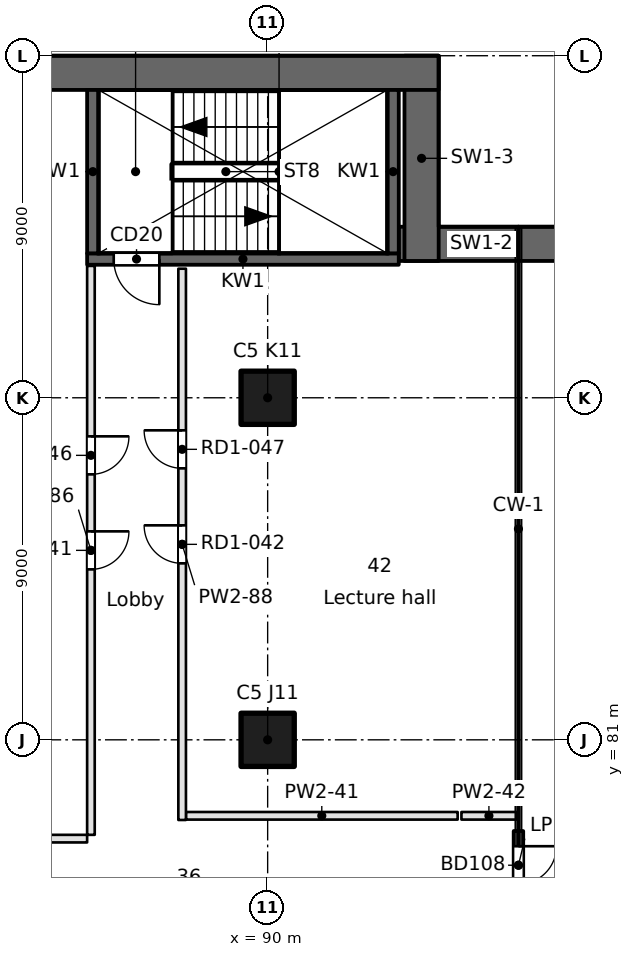
"""IFC4 building model, lengths in metres.
Left out: names, types, materials, properties, quantities, classifications, styles, units other than length and angle.
Written with IfcOpenShell. Run it as: python <this file> out.ifc"""

import sys

from ifc_helpers import new_model, si_unit, direction, frame, frame_2d, origin, origin_2d, place, context, subcontext, project, spatial, rectangle, extrude, element, fill, save


model = new_model("IFC4")
c1 = context("Model", 3, precision=1e-05, world=origin(), true_north=direction((0.0, 1.0)))
c2 = subcontext(c1, "Body", "Model", "MODEL_VIEW")
j1 = project(units=[si_unit("LENGTHUNIT", "METRE"), si_unit("PLANEANGLEUNIT", "RADIAN")], contexts=[c1])
p1 = place(None, origin())
s1 = spatial("IfcSite", under=j1, at=p1, CompositionType="ELEMENT")
p2 = place(p1, origin())
s2 = spatial("IfcBuilding", under=s1, at=p2, CompositionType="ELEMENT")
p3 = place(p2, frame((0.0, 0.0, 72.8)))
s3 = spatial("IfcBuildingStorey", under=s2, at=p3, CompositionType="ELEMENT", Elevation=72.8)
for number, where, z_axis, x_axis in (
    (1, (90.0, 81.0, 0.0), (0.0, 0.0, 1.0), (1.0, 0.0, 0.0)),
    (2, (90.0, 90.0, 0.0), (0.0, 0.0, 1.0), (1.0, 0.0, 0.0)),
):
    element("IfcColumn", number, at=place(p3, frame(where, z_axis=z_axis, x_axis=x_axis)), inside=s3, PredefinedType="COLUMN", context=c2, shape_type="SweptSolid", body=[
        extrude(rectangle(XDim=1.4, YDim=1.4, at=origin_2d()), origin(), (0.0, 0.0, 1.0), 3.7),
    ])
p4 = place(p3, frame((97.8, 94.05, 0.0), z_axis=(0.0, 0.0, 1.0), x_axis=(-1.0, 0.0, 0.0)))
e3 = element("IfcWall", 3, at=p4, inside=s3, PredefinedType="SHEAR", context=c2, shape_type="SweptSolid", body=[
    extrude(rectangle(XDim=4.351, YDim=0.9, at=frame_2d((2.175, 0.0))), origin(), (0.0, 0.0, 1.0), 3.7),
])
p5 = place(p3, frame((94.05, 93.6, 0.0), z_axis=(0.0, 0.0, 1.0), x_axis=(0.0, 1.0, 0.0)))
e4 = element("IfcWall", 4, at=p5, inside=s3, PredefinedType="SHEAR", context=c2, shape_type="SweptSolid", body=[
    extrude(rectangle(XDim=5.4, YDim=0.9, at=frame_2d((2.7, 0.0))), origin(), (0.0, 0.0, 1.0), 3.7),
])
p6 = place(p3, frame((94.5, 98.55, 0.0), z_axis=(0.0, 0.0, 1.0), x_axis=(-1.0, 0.0, 0.0)))
e5 = element("IfcWall", 5, at=p6, inside=s3, PredefinedType="SHEAR", context=c2, shape_type="SweptSolid", body=[
    extrude(rectangle(XDim=90.0, YDim=0.9, at=frame_2d((45.0, 0.0))), origin(), (0.0, 0.0, 1.0), 3.7),
])
p7 = place(p3, frame((96.599, 76.801, 0.0), z_axis=(0.0, 0.0, 1.0), x_axis=(0.0, 1.0, 0.0)))
e6 = element("IfcWall", 6, at=p7, inside=s3, PredefinedType="SOLIDWALL", context=c2, shape_type="SweptSolid", body=[
    extrude(rectangle(XDim=1.8, YDim=0.25, at=frame_2d((0.9, 0.0))), origin(), (0.0, 0.0, 1.0), 3.3),
])
p8 = place(p7, frame((0.4, 0.0, 0.0)))
e7 = element("IfcOpeningElement", 7, at=p8, cuts=e6, PredefinedType="OPENING", context=c2, shape_type="SweptSolid", body=[
    extrude(rectangle(XDim=1.0, YDim=2.1, at=frame_2d((0.5, 1.05))), frame((0.0, 0.125, 0.0), z_axis=(0.0, -1.0, 0.0), x_axis=(1.0, 0.0, 0.0)), (0.0, 0.0, 1.0), 0.25),
])
p9 = place(p3, frame((85.25, 93.65, -0.4), z_axis=(0.0, 0.0, 1.0), x_axis=(1.0, 0.0, 0.0)))
e8 = element("IfcWall", 8, at=p9, inside=s3, PredefinedType="SOLIDWALL", context=c2, shape_type="SweptSolid", body=[
    extrude(rectangle(XDim=8.2, YDim=0.3, at=frame_2d((4.1, 0.0))), origin(), (0.0, 0.0, 1.0), 3.7),
])
p10 = place(p9, frame((0.7, 0.0, 0.4)))
e9 = element("IfcOpeningElement", 9, at=p10, cuts=e8, PredefinedType="OPENING", context=c2, shape_type="SweptSolid", body=[
    extrude(rectangle(XDim=1.2, YDim=2.1, at=frame_2d((0.6, 1.05))), frame((0.0, 0.15, 0.0), z_axis=(0.0, -1.0, 0.0), x_axis=(1.0, 0.0, 0.0)), (0.0, 0.0, 1.0), 0.3),
])
for number, where, z_axis, x_axis in (
    (10, (85.4, 93.8, -0.4), (0.0, 0.0, 1.0), (0.0, 1.0, 0.0)),
    (11, (93.3, 93.8, -0.4), (0.0, 0.0, 1.0), (0.0, 1.0, 0.0)),
):
    element("IfcWall", number, at=place(p3, frame(where, z_axis=z_axis, x_axis=x_axis)), inside=s3, PredefinedType="SOLIDWALL", context=c2, shape_type="SweptSolid", body=[
        extrude(rectangle(XDim=4.3, YDim=0.3, at=frame_2d((2.15, 0.0))), origin(), (0.0, 0.0, 1.0), 3.7),
    ])
p11 = place(p3, frame((70.0, 78.4, 0.0), z_axis=(0.0, 0.0, 1.0), x_axis=(1.0, 0.0, 0.0)))
e12 = element("IfcWall", 12, at=p11, inside=s3, PredefinedType="PARTITIONING", context=c2, shape_type="SweptSolid", body=[
    extrude(rectangle(XDim=15.25, YDim=0.2, at=frame_2d((7.625, 0.0))), origin(), (0.0, 0.0, 1.0), 3.3),
])
p12 = place(p3, frame((87.85, 79.001, 0.0), z_axis=(0.0, 0.0, 1.0), x_axis=(1.0, 0.0, 0.0)))
e13 = element("IfcWall", 13, at=p12, inside=s3, PredefinedType="PARTITIONING", context=c2, shape_type="SweptSolid", body=[
    extrude(rectangle(XDim=7.149, YDim=0.2, at=frame_2d((3.574, 0.0))), origin(), (0.0, 0.0, 1.0), 3.3),
])
p13 = place(p3, frame((95.099, 79.001, 0.0), z_axis=(0.0, 0.0, 1.0), x_axis=(1.0, 0.0, 0.0)))
e14 = element("IfcWall", 14, at=p13, inside=s3, PredefinedType="PARTITIONING", context=c2, shape_type="SweptSolid", body=[
    extrude(rectangle(XDim=1.446, YDim=0.2, at=frame_2d((0.723, 0.0))), origin(), (0.0, 0.0, 1.0), 3.3),
])
p14 = place(p3, frame((85.35, 78.5, 0.0), z_axis=(0.0, 0.0, 1.0), x_axis=(0.0, 1.0, 0.0)))
e15 = element("IfcWall", 15, at=p14, inside=s3, PredefinedType="PARTITIONING", context=c2, shape_type="SweptSolid", body=[
    extrude(rectangle(XDim=14.97, YDim=0.2, at=frame_2d((7.485, 0.0))), origin(), (0.0, 0.0, 1.0), 3.3),
])
p15 = place(p14, frame((6.985, 0.0, 0.0)))
e16 = element("IfcOpeningElement", 16, at=p15, cuts=e15, PredefinedType="OPENING", context=c2, shape_type="SweptSolid", body=[
    extrude(rectangle(XDim=1.0, YDim=2.1, at=frame_2d((0.5, 1.05))), frame((0.0, 0.1, 0.0), z_axis=(0.0, -1.0, 0.0), x_axis=(1.0, 0.0, 0.0)), (0.0, 0.0, 1.0), 0.2),
])
p16 = place(p14, frame((9.485, 0.0, 0.0)))
e17 = element("IfcOpeningElement", 17, at=p16, cuts=e15, PredefinedType="OPENING", context=c2, shape_type="SweptSolid", body=[
    extrude(rectangle(XDim=1.0, YDim=2.1, at=frame_2d((0.5, 1.05))), frame((0.0, 0.1, 0.0), z_axis=(0.0, -1.0, 0.0), x_axis=(1.0, 0.0, 0.0)), (0.0, 0.0, 1.0), 0.2),
])
p17 = place(p3, frame((87.75, 93.396, 0.0), z_axis=(0.0, 0.0, 1.0), x_axis=(0.0, -1.0, 0.0)))
e18 = element("IfcWall", 18, at=p17, inside=s3, PredefinedType="PARTITIONING", context=c2, shape_type="SweptSolid", body=[
    extrude(rectangle(XDim=14.505, YDim=0.2, at=frame_2d((7.253, 0.0))), origin(), (0.0, 0.0, 1.0), 3.3),
])
p18 = place(p17, frame((6.753, 0.0, 0.0)))
e19 = element("IfcOpeningElement", 19, at=p18, cuts=e18, PredefinedType="OPENING", context=c2, shape_type="SweptSolid", body=[
    extrude(rectangle(XDim=1.0, YDim=2.1, at=frame_2d((0.5, 1.05))), frame((0.0, 0.1, 0.0), z_axis=(0.0, -1.0, 0.0), x_axis=(1.0, 0.0, 0.0)), (0.0, 0.0, 1.0), 0.2),
])
p19 = place(p17, frame((4.253, 0.0, 0.0)))
e20 = element("IfcOpeningElement", 20, at=p19, cuts=e18, PredefinedType="OPENING", context=c2, shape_type="SweptSolid", body=[
    extrude(rectangle(XDim=1.0, YDim=2.1, at=frame_2d((0.5, 1.05))), frame((0.0, 0.1, 0.0), z_axis=(0.0, -1.0, 0.0), x_axis=(1.0, 0.0, 0.0)), (0.0, 0.0, 1.0), 0.2),
])
p20 = place(p8, frame((1.0, 0.0, 0.0), z_axis=(0.0, 0.0, 1.0), x_axis=(-1.0, 0.0, 0.0)))
e21 = element("IfcDoor", 21, at=p20, inside=s3, OperationType="SINGLE_SWING_LEFT", PredefinedType="DOOR", context=c2, shape_type="SweptSolid", body=[
    extrude(rectangle(XDim=1.0, YDim=2.1, at=frame_2d((0.5, 1.05))), frame((0.0, 0.025, 0.0), z_axis=(0.0, -1.0, 0.0), x_axis=(1.0, 0.0, 0.0)), (0.0, 0.0, 1.0), 0.05),
])
fill(e7, e21)
p21 = place(p10, frame((1.2, 0.0, 0.0), z_axis=(0.0, 0.0, 1.0), x_axis=(-1.0, 0.0, 0.0)))
e22 = element("IfcDoor", 22, at=p21, inside=s3, OperationType="SINGLE_SWING_LEFT", PredefinedType="DOOR", context=c2, shape_type="SweptSolid", body=[
    extrude(rectangle(XDim=1.2, YDim=2.1, at=frame_2d((0.6, 1.05))), frame((0.0, 0.025, 0.0), z_axis=(0.0, -1.0, 0.0), x_axis=(1.0, 0.0, 0.0)), (0.0, 0.0, 1.0), 0.05),
])
fill(e9, e22)
p22 = place(p15, frame((1.0, 0.0, 0.0), z_axis=(0.0, 0.0, 1.0), x_axis=(-1.0, 0.0, 0.0)))
e23 = element("IfcDoor", 23, at=p22, inside=s3, OperationType="SINGLE_SWING_LEFT", PredefinedType="DOOR", context=c2, shape_type="SweptSolid", body=[
    extrude(rectangle(XDim=1.0, YDim=2.1, at=frame_2d((0.5, 1.05))), frame((0.0, 0.025, 0.0), z_axis=(0.0, -1.0, 0.0), x_axis=(1.0, 0.0, 0.0)), (0.0, 0.0, 1.0), 0.05),
])
fill(e16, e23)
p23 = place(p18, frame((1.0, 0.0, 0.0), z_axis=(0.0, 0.0, 1.0), x_axis=(-1.0, 0.0, 0.0)))
e24 = element("IfcDoor", 24, at=p23, inside=s3, OperationType="SINGLE_SWING_RIGHT", PredefinedType="DOOR", context=c2, shape_type="SweptSolid", body=[
    extrude(rectangle(XDim=1.0, YDim=2.1, at=frame_2d((0.5, 1.05))), frame((0.0, 0.025, 0.0), z_axis=(0.0, -1.0, 0.0), x_axis=(1.0, 0.0, 0.0)), (0.0, 0.0, 1.0), 0.05),
])
fill(e19, e24)
p24 = place(p16, frame((1.0, 0.0, 0.0), z_axis=(0.0, 0.0, 1.0), x_axis=(-1.0, 0.0, 0.0)))
e25 = element("IfcDoor", 25, at=p24, inside=s3, OperationType="SINGLE_SWING_LEFT", PredefinedType="DOOR", context=c2, shape_type="SweptSolid", body=[
    extrude(rectangle(XDim=1.0, YDim=2.1, at=frame_2d((0.5, 1.05))), frame((0.0, 0.025, 0.0), z_axis=(0.0, -1.0, 0.0), x_axis=(1.0, 0.0, 0.0)), (0.0, 0.0, 1.0), 0.05),
])
fill(e17, e25)
p25 = place(p19, frame((1.0, 0.0, 0.0), z_axis=(0.0, 0.0, 1.0), x_axis=(-1.0, 0.0, 0.0)))
e26 = element("IfcDoor", 26, at=p25, inside=s3, OperationType="SINGLE_SWING_RIGHT", PredefinedType="DOOR", context=c2, shape_type="SweptSolid", body=[
    extrude(rectangle(XDim=1.0, YDim=2.1, at=frame_2d((0.5, 1.05))), frame((0.0, 0.025, 0.0), z_axis=(0.0, -1.0, 0.0), x_axis=(1.0, 0.0, 0.0)), (0.0, 0.0, 1.0), 0.05),
])
fill(e20, e26)
save(model, sys.argv[1])
